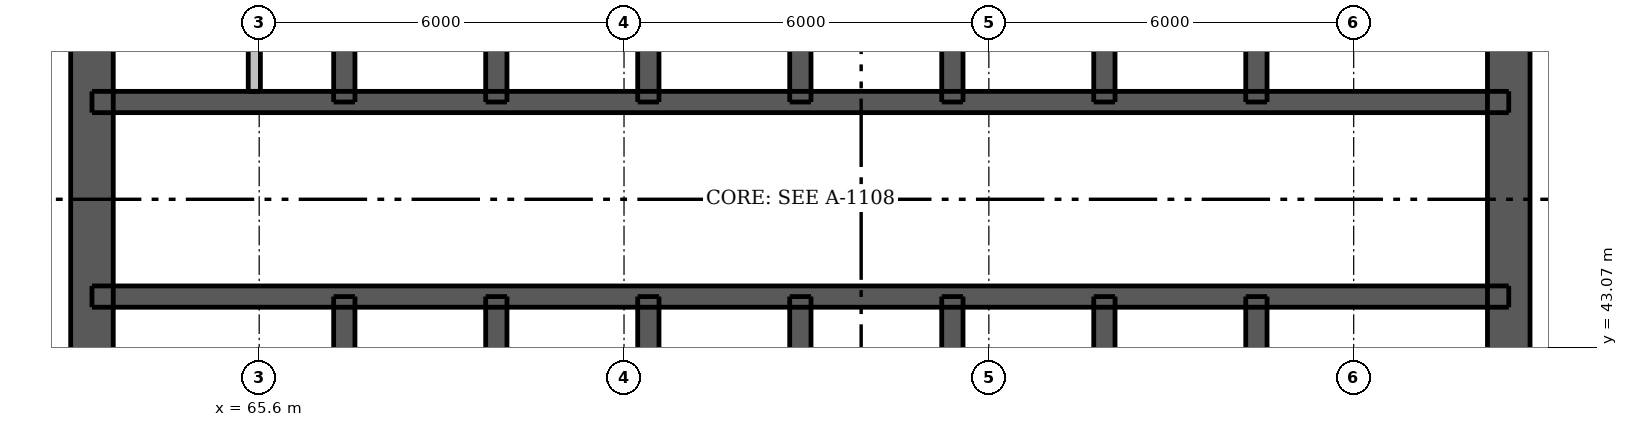
"""IFC4 building model, lengths in metres.
Left out: names, types, materials, properties, quantities, classifications, styles, units other than length and angle.
Written with IfcOpenShell. Run it as: python <this file> out.ifc"""

import sys

from ifc_helpers import new_model, si_unit, direction, frame, frame_2d, origin, place, context, subcontext, project, spatial, rectangle, extrude, element, fill, save


model = new_model("IFC4")
c1 = context("Model", 3, precision=1e-05, world=origin(), true_north=direction((0.0, 1.0)))
c2 = subcontext(c1, "Body", "Model", "MODEL_VIEW")
j1 = project(units=[si_unit("LENGTHUNIT", "METRE"), si_unit("PLANEANGLEUNIT", "RADIAN")], contexts=[c1])
p1 = place(None, origin())
s1 = spatial("IfcSite", under=j1, at=p1, CompositionType="ELEMENT")
p2 = place(p1, origin())
s2 = spatial("IfcBuilding", under=s1, at=p2, CompositionType="ELEMENT")
p3 = place(p2, frame((0.0, 0.0, 178.0)))
s3 = spatial("IfcBuildingStorey", under=s2, at=p3, CompositionType="ELEMENT", Elevation=178.0)
p4 = place(p3, frame((62.85, 33.5, 0.0), z_axis=(0.0, 0.0, 1.0), x_axis=(0.0, 1.0, 0.0)))
e1 = element("IfcWall", 1, at=p4, inside=s3, PredefinedType="SHEAR", context=c2, shape_type="SweptSolid", body=[
    extrude(rectangle(XDim=24.0, YDim=0.7, at=frame_2d((12.0, 0.0))), origin(), (0.0, 0.0, 1.0), 8.75),
])
p5 = place(p4, frame((11.2, 0.0, 0.0)))
e2 = element("IfcOpeningElement", 2, at=p5, cuts=e1, PredefinedType="OPENING", context=c2, shape_type="SweptSolid", body=[
    extrude(rectangle(XDim=1.6, YDim=2.1, at=frame_2d((0.8, 1.05))), frame((0.0, 0.36, 0.0), z_axis=(0.0, -1.0, 0.0), x_axis=(1.0, 0.0, 0.0)), (0.0, 0.0, 1.0), 0.72),
])
p6 = place(p3, frame((86.15, 33.5, 0.0), z_axis=(0.0, 0.0, 1.0), x_axis=(0.0, 1.0, 0.0)))
e3 = element("IfcWall", 3, at=p6, inside=s3, PredefinedType="SHEAR", context=c2, shape_type="SweptSolid", body=[
    extrude(rectangle(XDim=24.0, YDim=0.7, at=frame_2d((12.0, 0.0))), origin(), (0.0, 0.0, 1.0), 8.75),
])
p7 = place(p6, frame((11.2, 0.0, 0.0)))
e4 = element("IfcOpeningElement", 4, at=p7, cuts=e3, PredefinedType="OPENING", context=c2, shape_type="SweptSolid", body=[
    extrude(rectangle(XDim=1.6, YDim=2.1, at=frame_2d((0.8, 1.05))), frame((0.0, 0.36, 0.0), z_axis=(0.0, -1.0, 0.0), x_axis=(1.0, 0.0, 0.0)), (0.0, 0.0, 1.0), 0.72),
])
p8 = place(p3, frame((62.85, 43.9, 0.0), z_axis=(0.0, 0.0, 1.0), x_axis=(1.0, 0.0, 0.0)))
e5 = element("IfcWall", 5, at=p8, inside=s3, PredefinedType="SHEAR", context=c2, shape_type="SweptSolid", body=[
    extrude(rectangle(XDim=23.3, YDim=0.35, at=frame_2d((11.65, 0.0))), origin(), (0.0, 0.0, 1.0), 8.75),
])
p9 = place(p8, frame((1.712, 0.0, 0.0)))
e6 = element("IfcOpeningElement", 6, at=p9, cuts=e5, PredefinedType="OPENING", context=c2, shape_type="SweptSolid", body=[
    extrude(rectangle(XDim=0.9, YDim=2.1, at=frame_2d((0.45, 1.05))), frame((0.0, 0.185, 0.0), z_axis=(0.0, -1.0, 0.0), x_axis=(1.0, 0.0, 0.0)), (0.0, 0.0, 1.0), 0.37),
])
p10 = place(p8, frame((20.688, 0.0, 0.0)))
e7 = element("IfcOpeningElement", 7, at=p10, cuts=e5, PredefinedType="OPENING", context=c2, shape_type="SweptSolid", body=[
    extrude(rectangle(XDim=0.9, YDim=2.1, at=frame_2d((0.45, 1.05))), frame((0.0, 0.185, 0.0), z_axis=(0.0, -1.0, 0.0), x_axis=(1.0, 0.0, 0.0)), (0.0, 0.0, 1.0), 0.37),
])
p11 = place(p8, frame((4.95, 0.0, 0.0)))
e8 = element("IfcOpeningElement", 8, at=p11, cuts=e5, PredefinedType="OPENING", context=c2, shape_type="SweptSolid", body=[
    extrude(rectangle(XDim=0.9, YDim=2.1, at=frame_2d((0.45, 1.05))), frame((0.0, 0.185, 0.0), z_axis=(0.0, -1.0, 0.0), x_axis=(1.0, 0.0, 0.0)), (0.0, 0.0, 1.0), 0.37),
])
p12 = place(p8, frame((9.95, 0.0, 0.0)))
e9 = element("IfcOpeningElement", 9, at=p12, cuts=e5, PredefinedType="OPENING", context=c2, shape_type="SweptSolid", body=[
    extrude(rectangle(XDim=0.9, YDim=2.1, at=frame_2d((0.45, 1.05))), frame((0.0, 0.185, 0.0), z_axis=(0.0, -1.0, 0.0), x_axis=(1.0, 0.0, 0.0)), (0.0, 0.0, 1.0), 0.37),
])
p13 = place(p8, frame((12.45, 0.0, 0.0)))
e10 = element("IfcOpeningElement", 10, at=p13, cuts=e5, PredefinedType="OPENING", context=c2, shape_type="SweptSolid", body=[
    extrude(rectangle(XDim=0.9, YDim=2.1, at=frame_2d((0.45, 1.05))), frame((0.0, 0.185, 0.0), z_axis=(0.0, -1.0, 0.0), x_axis=(1.0, 0.0, 0.0)), (0.0, 0.0, 1.0), 0.37),
])
p14 = place(p8, frame((17.45, 0.0, 0.0)))
e11 = element("IfcOpeningElement", 11, at=p14, cuts=e5, PredefinedType="OPENING", context=c2, shape_type="SweptSolid", body=[
    extrude(rectangle(XDim=0.9, YDim=2.1, at=frame_2d((0.45, 1.05))), frame((0.0, 0.185, 0.0), z_axis=(0.0, -1.0, 0.0), x_axis=(1.0, 0.0, 0.0)), (0.0, 0.0, 1.0), 0.37),
])
p15 = place(p3, frame((62.85, 47.1, 0.0), z_axis=(0.0, 0.0, 1.0), x_axis=(1.0, 0.0, 0.0)))
e12 = element("IfcWall", 12, at=p15, inside=s3, PredefinedType="SHEAR", context=c2, shape_type="SweptSolid", body=[
    extrude(rectangle(XDim=23.3, YDim=0.35, at=frame_2d((11.65, 0.0))), origin(), (0.0, 0.0, 1.0), 8.75),
])
p16 = place(p15, frame((1.06, 0.0, 0.0)))
e13 = element("IfcOpeningElement", 13, at=p16, cuts=e12, PredefinedType="OPENING", context=c2, shape_type="SweptSolid", body=[
    extrude(rectangle(XDim=0.9, YDim=2.1, at=frame_2d((0.45, 1.05))), frame((0.0, 0.185, 0.0), z_axis=(0.0, -1.0, 0.0), x_axis=(1.0, 0.0, 0.0)), (0.0, 0.0, 1.0), 0.37),
])
p17 = place(p15, frame((2.923, 0.0, 0.0)))
e14 = element("IfcOpeningElement", 14, at=p17, cuts=e12, PredefinedType="OPENING", context=c2, shape_type="SweptSolid", body=[
    extrude(rectangle(XDim=0.8, YDim=2.1, at=frame_2d((0.4, 1.05))), frame((0.0, 0.185, 0.0), z_axis=(0.0, -1.0, 0.0), x_axis=(1.0, 0.0, 0.0)), (0.0, 0.0, 1.0), 0.37),
])
p18 = place(p15, frame((20.688, 0.0, 0.0)))
e15 = element("IfcOpeningElement", 15, at=p18, cuts=e12, PredefinedType="OPENING", context=c2, shape_type="SweptSolid", body=[
    extrude(rectangle(XDim=0.9, YDim=2.1, at=frame_2d((0.45, 1.05))), frame((0.0, 0.185, 0.0), z_axis=(0.0, -1.0, 0.0), x_axis=(1.0, 0.0, 0.0)), (0.0, 0.0, 1.0), 0.37),
])
p19 = place(p15, frame((4.85, 0.0, 0.0)))
e16 = element("IfcOpeningElement", 16, at=p19, cuts=e12, PredefinedType="OPENING", context=c2, shape_type="SweptSolid", body=[
    extrude(rectangle(XDim=1.1, YDim=2.1, at=frame_2d((0.55, 1.05))), frame((0.0, 0.185, 0.0), z_axis=(0.0, -1.0, 0.0), x_axis=(1.0, 0.0, 0.0)), (0.0, 0.0, 1.0), 0.37),
])
p20 = place(p15, frame((7.35, 0.0, 0.0)))
e17 = element("IfcOpeningElement", 17, at=p20, cuts=e12, PredefinedType="OPENING", context=c2, shape_type="SweptSolid", body=[
    extrude(rectangle(XDim=1.1, YDim=2.1, at=frame_2d((0.55, 1.05))), frame((0.0, 0.185, 0.0), z_axis=(0.0, -1.0, 0.0), x_axis=(1.0, 0.0, 0.0)), (0.0, 0.0, 1.0), 0.37),
])
p21 = place(p15, frame((9.85, 0.0, 0.0)))
e18 = element("IfcOpeningElement", 18, at=p21, cuts=e12, PredefinedType="OPENING", context=c2, shape_type="SweptSolid", body=[
    extrude(rectangle(XDim=1.1, YDim=2.1, at=frame_2d((0.55, 1.05))), frame((0.0, 0.185, 0.0), z_axis=(0.0, -1.0, 0.0), x_axis=(1.0, 0.0, 0.0)), (0.0, 0.0, 1.0), 0.37),
])
p22 = place(p15, frame((12.35, 0.0, 0.0)))
e19 = element("IfcOpeningElement", 19, at=p22, cuts=e12, PredefinedType="OPENING", context=c2, shape_type="SweptSolid", body=[
    extrude(rectangle(XDim=1.1, YDim=2.1, at=frame_2d((0.55, 1.05))), frame((0.0, 0.185, 0.0), z_axis=(0.0, -1.0, 0.0), x_axis=(1.0, 0.0, 0.0)), (0.0, 0.0, 1.0), 0.37),
])
p23 = place(p15, frame((14.85, 0.0, 0.0)))
e20 = element("IfcOpeningElement", 20, at=p23, cuts=e12, PredefinedType="OPENING", context=c2, shape_type="SweptSolid", body=[
    extrude(rectangle(XDim=1.1, YDim=2.1, at=frame_2d((0.55, 1.05))), frame((0.0, 0.185, 0.0), z_axis=(0.0, -1.0, 0.0), x_axis=(1.0, 0.0, 0.0)), (0.0, 0.0, 1.0), 0.37),
])
p24 = place(p15, frame((17.35, 0.0, 0.0)))
e21 = element("IfcOpeningElement", 21, at=p24, cuts=e12, PredefinedType="OPENING", context=c2, shape_type="SweptSolid", body=[
    extrude(rectangle(XDim=1.1, YDim=2.1, at=frame_2d((0.55, 1.05))), frame((0.0, 0.185, 0.0), z_axis=(0.0, -1.0, 0.0), x_axis=(1.0, 0.0, 0.0)), (0.0, 0.0, 1.0), 0.37),
])
for number, where, z_axis, x_axis in (
    (22, (67.0, 33.85, 0.0), (0.0, 0.0, 1.0), (0.0, 1.0, 0.0)),
    (23, (67.0, 47.1, 0.0), (0.0, 0.0, 1.0), (0.0, 1.0, 0.0)),
    (24, (82.0, 33.85, 0.0), (0.0, 0.0, 1.0), (0.0, 1.0, 0.0)),
    (25, (82.0, 47.1, 0.0), (0.0, 0.0, 1.0), (0.0, 1.0, 0.0)),
):
    element("IfcWall", number, at=place(p3, frame(where, z_axis=z_axis, x_axis=x_axis)), inside=s3, PredefinedType="SHEAR", context=c2, shape_type="SweptSolid", body=[
        extrude(rectangle(XDim=10.05, YDim=0.35, at=frame_2d((5.025, 0.0))), origin(), (0.0, 0.0, 1.0), 8.75),
    ])
for number, where, z_axis, x_axis in (
    (26, (69.5, 41.0, 0.0), (0.0, 0.0, 1.0), (0.0, 1.0, 0.0)),
    (27, (69.5, 47.1, 0.0), (0.0, 0.0, 1.0), (0.0, 1.0, 0.0)),
    (28, (72.0, 41.0, 0.0), (0.0, 0.0, 1.0), (0.0, 1.0, 0.0)),
    (29, (72.0, 47.1, 0.0), (0.0, 0.0, 1.0), (0.0, 1.0, 0.0)),
    (30, (74.5, 41.0, 0.0), (0.0, 0.0, 1.0), (0.0, 1.0, 0.0)),
    (31, (74.5, 47.1, 0.0), (0.0, 0.0, 1.0), (0.0, 1.0, 0.0)),
    (32, (77.0, 41.0, 0.0), (0.0, 0.0, 1.0), (0.0, 1.0, 0.0)),
    (33, (77.0, 47.1, 0.0), (0.0, 0.0, 1.0), (0.0, 1.0, 0.0)),
    (34, (79.5, 41.0, 0.0), (0.0, 0.0, 1.0), (0.0, 1.0, 0.0)),
    (35, (79.5, 47.1, 0.0), (0.0, 0.0, 1.0), (0.0, 1.0, 0.0)),
):
    element("IfcWall", number, at=place(p3, frame(where, z_axis=z_axis, x_axis=x_axis)), inside=s3, PredefinedType="SHEAR", context=c2, shape_type="SweptSolid", body=[
        extrude(rectangle(XDim=2.9, YDim=0.35, at=frame_2d((1.45, 0.0))), origin(), (0.0, 0.0, 1.0), 8.75),
    ])
p25 = place(p3, frame((65.52, 47.275, 0.0), z_axis=(0.0, 0.0, 1.0), x_axis=(0.0, 1.0, 0.0)))
e36 = element("IfcWall", 36, at=p25, inside=s3, PredefinedType="PLUMBINGWALL", context=c2, shape_type="SweptSolid", body=[
    extrude(rectangle(XDim=2.55, YDim=0.2, at=frame_2d((1.275, 0.0))), origin(), (0.0, 0.0, 1.0), 8.75),
])
p26 = place(p5, origin())
e37 = element("IfcDoor", 37, at=p26, inside=s3, OperationType="DOUBLE_DOOR_SINGLE_SWING", PredefinedType="DOOR", context=c2, shape_type="SweptSolid", body=[
    extrude(rectangle(XDim=1.6, YDim=2.1, at=frame_2d((0.8, 1.05))), frame((0.0, -0.288, 0.0), z_axis=(0.0, -1.0, 0.0), x_axis=(1.0, 0.0, 0.0)), (0.0, 0.0, 1.0), 0.05),
])
fill(e2, e37)
p27 = place(p7, origin())
e38 = element("IfcDoor", 38, at=p27, inside=s3, OperationType="DOUBLE_DOOR_SINGLE_SWING", PredefinedType="DOOR", context=c2, shape_type="SweptSolid", body=[
    extrude(rectangle(XDim=1.6, YDim=2.1, at=frame_2d((0.8, 1.05))), frame((0.0, 0.337, 0.0), z_axis=(0.0, -1.0, 0.0), x_axis=(1.0, 0.0, 0.0)), (0.0, 0.0, 1.0), 0.05),
])
fill(e4, e38)
p28 = place(p9, origin())
e39 = element("IfcDoor", 39, at=p28, inside=s3, OperationType="SINGLE_SWING_LEFT", PredefinedType="DOOR", context=c2, shape_type="SweptSolid", body=[
    extrude(rectangle(XDim=0.9, YDim=2.1, at=frame_2d((0.45, 1.05))), frame((0.0, -0.112, 0.0), z_axis=(0.0, -1.0, 0.0), x_axis=(1.0, 0.0, 0.0)), (0.0, 0.0, 1.0), 0.05),
])
fill(e6, e39)
p29 = place(p10, origin())
e40 = element("IfcDoor", 40, at=p29, inside=s3, OperationType="SINGLE_SWING_LEFT", PredefinedType="DOOR", context=c2, shape_type="SweptSolid", body=[
    extrude(rectangle(XDim=0.9, YDim=2.1, at=frame_2d((0.45, 1.05))), frame((0.0, -0.112, 0.0), z_axis=(0.0, -1.0, 0.0), x_axis=(1.0, 0.0, 0.0)), (0.0, 0.0, 1.0), 0.05),
])
fill(e7, e40)
p30 = place(p16, origin())
e41 = element("IfcDoor", 41, at=p30, inside=s3, OperationType="SINGLE_SWING_LEFT", PredefinedType="DOOR", context=c2, shape_type="SweptSolid", body=[
    extrude(rectangle(XDim=0.9, YDim=2.1, at=frame_2d((0.45, 1.05))), frame((0.0, 0.163, 0.0), z_axis=(0.0, -1.0, 0.0), x_axis=(1.0, 0.0, 0.0)), (0.0, 0.0, 1.0), 0.05),
])
fill(e13, e41)
p31 = place(p17, origin())
e42 = element("IfcDoor", 42, at=p31, inside=s3, OperationType="SINGLE_SWING_RIGHT", PredefinedType="DOOR", context=c2, shape_type="SweptSolid", body=[
    extrude(rectangle(XDim=0.8, YDim=2.1, at=frame_2d((0.4, 1.05))), frame((0.0, 0.163, 0.0), z_axis=(0.0, -1.0, 0.0), x_axis=(1.0, 0.0, 0.0)), (0.0, 0.0, 1.0), 0.05),
])
fill(e14, e42)
p32 = place(p18, origin())
e43 = element("IfcDoor", 43, at=p32, inside=s3, OperationType="SINGLE_SWING_LEFT", PredefinedType="DOOR", context=c2, shape_type="SweptSolid", body=[
    extrude(rectangle(XDim=0.9, YDim=2.1, at=frame_2d((0.45, 1.05))), frame((0.0, 0.163, 0.0), z_axis=(0.0, -1.0, 0.0), x_axis=(1.0, 0.0, 0.0)), (0.0, 0.0, 1.0), 0.05),
])
fill(e15, e43)
p33 = place(p11, origin())
e44 = element("IfcDoor", 44, at=p33, inside=s3, OperationType="SINGLE_SWING_RIGHT", PredefinedType="DOOR", context=c2, shape_type="SweptSolid", body=[
    extrude(rectangle(XDim=0.9, YDim=2.1, at=frame_2d((0.45, 1.05))), frame((0.0, -0.112, 0.0), z_axis=(0.0, -1.0, 0.0), x_axis=(1.0, 0.0, 0.0)), (0.0, 0.0, 1.0), 0.05),
])
fill(e8, e44)
p34 = place(p12, origin())
e45 = element("IfcDoor", 45, at=p34, inside=s3, OperationType="SINGLE_SWING_RIGHT", PredefinedType="DOOR", context=c2, shape_type="SweptSolid", body=[
    extrude(rectangle(XDim=0.9, YDim=2.1, at=frame_2d((0.45, 1.05))), frame((0.0, -0.112, 0.0), z_axis=(0.0, -1.0, 0.0), x_axis=(1.0, 0.0, 0.0)), (0.0, 0.0, 1.0), 0.05),
])
fill(e9, e45)
p35 = place(p13, origin())
e46 = element("IfcDoor", 46, at=p35, inside=s3, OperationType="SINGLE_SWING_LEFT", PredefinedType="DOOR", context=c2, shape_type="SweptSolid", body=[
    extrude(rectangle(XDim=0.9, YDim=2.1, at=frame_2d((0.45, 1.05))), frame((0.0, -0.112, 0.0), z_axis=(0.0, -1.0, 0.0), x_axis=(1.0, 0.0, 0.0)), (0.0, 0.0, 1.0), 0.05),
])
fill(e10, e46)
p36 = place(p14, origin())
e47 = element("IfcDoor", 47, at=p36, inside=s3, OperationType="SINGLE_SWING_LEFT", PredefinedType="DOOR", context=c2, shape_type="SweptSolid", body=[
    extrude(rectangle(XDim=0.9, YDim=2.1, at=frame_2d((0.45, 1.05))), frame((0.0, -0.112, 0.0), z_axis=(0.0, -1.0, 0.0), x_axis=(1.0, 0.0, 0.0)), (0.0, 0.0, 1.0), 0.05),
])
fill(e11, e47)
p37 = place(p19, origin())
e48 = element("IfcDoor", 48, at=p37, inside=s3, OperationType="DOUBLE_DOOR_SLIDING", PredefinedType="DOOR", context=c2, shape_type="SweptSolid", body=[
    extrude(rectangle(XDim=1.1, YDim=2.1, at=frame_2d((0.55, 1.05))), frame((0.0, 0.025, 0.0), z_axis=(0.0, -1.0, 0.0), x_axis=(1.0, 0.0, 0.0)), (0.0, 0.0, 1.0), 0.05),
])
fill(e16, e48)
p38 = place(p20, origin())
e49 = element("IfcDoor", 49, at=p38, inside=s3, OperationType="DOUBLE_DOOR_SLIDING", PredefinedType="DOOR", context=c2, shape_type="SweptSolid", body=[
    extrude(rectangle(XDim=1.1, YDim=2.1, at=frame_2d((0.55, 1.05))), frame((0.0, 0.025, 0.0), z_axis=(0.0, -1.0, 0.0), x_axis=(1.0, 0.0, 0.0)), (0.0, 0.0, 1.0), 0.05),
])
fill(e17, e49)
p39 = place(p21, origin())
e50 = element("IfcDoor", 50, at=p39, inside=s3, OperationType="DOUBLE_DOOR_SLIDING", PredefinedType="DOOR", context=c2, shape_type="SweptSolid", body=[
    extrude(rectangle(XDim=1.1, YDim=2.1, at=frame_2d((0.55, 1.05))), frame((0.0, 0.025, 0.0), z_axis=(0.0, -1.0, 0.0), x_axis=(1.0, 0.0, 0.0)), (0.0, 0.0, 1.0), 0.05),
])
fill(e18, e50)
p40 = place(p22, origin())
e51 = element("IfcDoor", 51, at=p40, inside=s3, OperationType="DOUBLE_DOOR_SLIDING", PredefinedType="DOOR", context=c2, shape_type="SweptSolid", body=[
    extrude(rectangle(XDim=1.1, YDim=2.1, at=frame_2d((0.55, 1.05))), frame((0.0, 0.025, 0.0), z_axis=(0.0, -1.0, 0.0), x_axis=(1.0, 0.0, 0.0)), (0.0, 0.0, 1.0), 0.05),
])
fill(e19, e51)
p41 = place(p23, origin())
e52 = element("IfcDoor", 52, at=p41, inside=s3, OperationType="DOUBLE_DOOR_SLIDING", PredefinedType="DOOR", context=c2, shape_type="SweptSolid", body=[
    extrude(rectangle(XDim=1.1, YDim=2.1, at=frame_2d((0.55, 1.05))), frame((0.0, 0.025, 0.0), z_axis=(0.0, -1.0, 0.0), x_axis=(1.0, 0.0, 0.0)), (0.0, 0.0, 1.0), 0.05),
])
fill(e20, e52)
p42 = place(p24, origin())
e53 = element("IfcDoor", 53, at=p42, inside=s3, OperationType="DOUBLE_DOOR_SLIDING", PredefinedType="DOOR", context=c2, shape_type="SweptSolid", body=[
    extrude(rectangle(XDim=1.1, YDim=2.1, at=frame_2d((0.55, 1.05))), frame((0.0, 0.025, 0.0), z_axis=(0.0, -1.0, 0.0), x_axis=(1.0, 0.0, 0.0)), (0.0, 0.0, 1.0), 0.05),
])
fill(e21, e53)
save(model, sys.argv[1])
